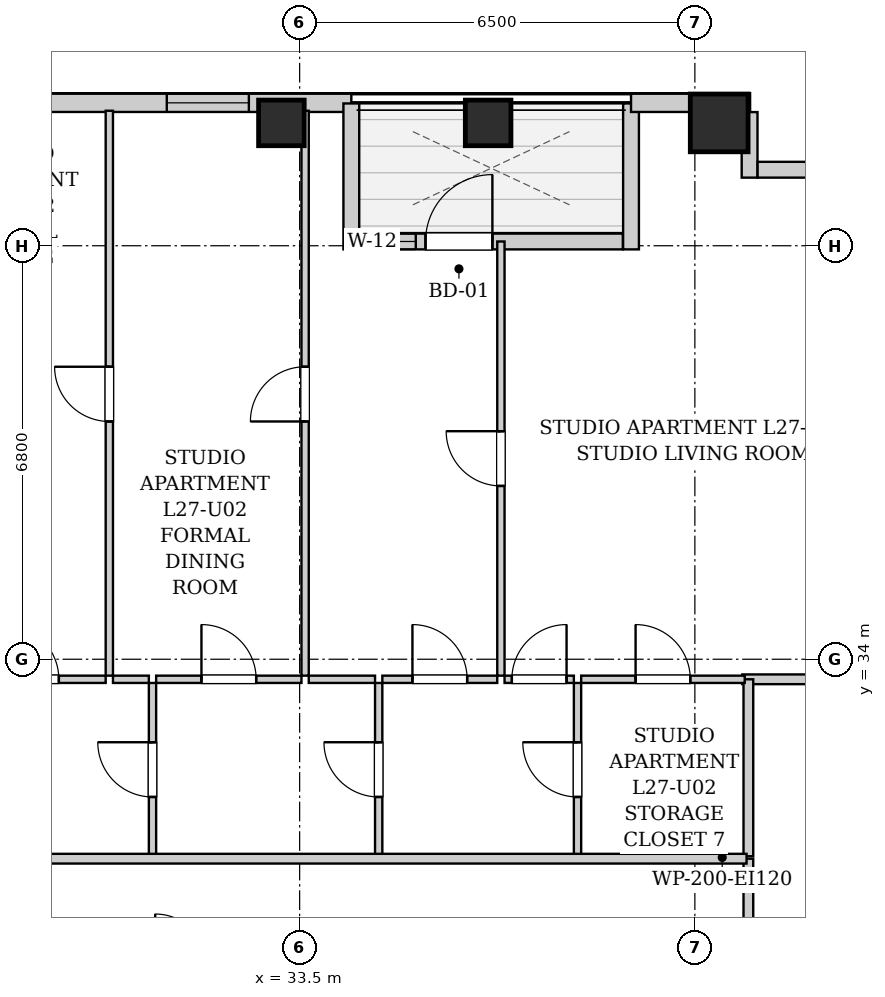
"""IFC4 building model, lengths in metres.
Left out: names, types, materials, properties, quantities, classifications, styles, units other than length and angle.
Written with IfcOpenShell. Run it as: python <this file> out.ifc"""

import sys

from ifc_helpers import new_model, si_unit, direction, frame, frame_2d, origin, origin_2d, place, context, subcontext, project, spatial, rectangle, extrude, element, fill, save


model = new_model("IFC4")
c1 = context("Model", 3, precision=1e-05, world=origin(), true_north=direction((0.0, 1.0)))
c2 = subcontext(c1, "Body", "Model", "MODEL_VIEW")
j1 = project(units=[si_unit("LENGTHUNIT", "METRE"), si_unit("PLANEANGLEUNIT", "RADIAN")], contexts=[c1])
p1 = place(None, origin())
s1 = spatial("IfcSite", under=j1, at=p1, CompositionType="ELEMENT")
p2 = place(p1, origin())
s2 = spatial("IfcBuilding", under=s1, at=p2, CompositionType="ELEMENT")
p3 = place(p2, frame((0.0, 0.0, 97.5)))
s3 = spatial("IfcBuildingStorey", under=s2, at=p3, CompositionType="ELEMENT", Elevation=97.5)
for number, where, z_axis, x_axis in (
    (1, (33.2, 42.82, 0.0), (0.0, 0.0, 1.0), (1.0, 0.0, 0.0)),
    (2, (36.6, 42.82, 0.0), (0.0, 0.0, 1.0), (1.0, 0.0, 0.0)),
):
    element("IfcColumn", number, at=place(p3, frame(where, z_axis=z_axis, x_axis=x_axis)), inside=s3, PredefinedType="COLUMN", context=c2, shape_type="SweptSolid", body=[
        extrude(rectangle(XDim=0.75, YDim=0.75, at=origin_2d()), origin(), (0.0, 0.0, 1.0), 3.2),
    ])
p4 = place(p3, frame((40.4, 42.82, 0.0), z_axis=(0.0, 0.0, 1.0), x_axis=(1.0, 0.0, 0.0)))
e3 = element("IfcColumn", 3, at=p4, inside=s3, PredefinedType="COLUMN", context=c2, shape_type="SweptSolid", body=[
    extrude(rectangle(XDim=0.95, YDim=0.95, at=origin_2d()), origin(), (0.0, 0.0, 1.0), 3.2),
])
p5 = place(p3, frame((10.0, 43.15, 0.0), z_axis=(0.0, 0.0, 1.0), x_axis=(1.0, 0.0, 0.0)))
e4 = element("IfcWall", 4, at=p5, inside=s3, PredefinedType="SOLIDWALL", context=c2, shape_type="SweptSolid", body=[
    extrude(rectangle(XDim=24.35, YDim=0.3, at=frame_2d((12.175, 0.0))), origin(), (0.0, 0.0, 1.0), 2.94),
])
p6 = place(p5, frame((1.956, 0.0, 0.55)))
e5 = element("IfcOpeningElement", 5, at=p6, cuts=e4, PredefinedType="OPENING", context=c2, shape_type="SweptSolid", body=[
    extrude(rectangle(XDim=1.35, YDim=1.2, at=frame_2d((0.675, 0.6))), frame((0.0, 0.16, 0.0), z_axis=(0.0, -1.0, 0.0), x_axis=(1.0, 0.0, 0.0)), (0.0, 0.0, 1.0), 0.32),
])
p7 = place(p5, frame((5.187, 0.0, 0.55)))
e6 = element("IfcOpeningElement", 6, at=p7, cuts=e4, PredefinedType="OPENING", context=c2, shape_type="SweptSolid", body=[
    extrude(rectangle(XDim=1.35, YDim=1.2, at=frame_2d((0.675, 0.6))), frame((0.0, 0.16, 0.0), z_axis=(0.0, -1.0, 0.0), x_axis=(1.0, 0.0, 0.0)), (0.0, 0.0, 1.0), 0.32),
])
p8 = place(p5, frame((8.418, 0.0, 0.55)))
e7 = element("IfcOpeningElement", 7, at=p8, cuts=e4, PredefinedType="OPENING", context=c2, shape_type="SweptSolid", body=[
    extrude(rectangle(XDim=1.35, YDim=1.2, at=frame_2d((0.675, 0.6))), frame((0.0, 0.16, 0.0), z_axis=(0.0, -1.0, 0.0), x_axis=(1.0, 0.0, 0.0)), (0.0, 0.0, 1.0), 0.32),
])
p9 = place(p5, frame((11.15, 0.0, 0.55)))
e8 = element("IfcOpeningElement", 8, at=p9, cuts=e4, PredefinedType="OPENING", context=c2, shape_type="SweptSolid", body=[
    extrude(rectangle(XDim=1.35, YDim=1.2, at=frame_2d((0.675, 0.6))), frame((0.0, 0.16, 0.0), z_axis=(0.0, -1.0, 0.0), x_axis=(1.0, 0.0, 0.0)), (0.0, 0.0, 1.0), 0.32),
])
p10 = place(p5, frame((18.038, 0.0, 0.55)))
e9 = element("IfcOpeningElement", 9, at=p10, cuts=e4, PredefinedType="OPENING", context=c2, shape_type="SweptSolid", body=[
    extrude(rectangle(XDim=1.35, YDim=1.2, at=frame_2d((0.675, 0.6))), frame((0.0, 0.16, 0.0), z_axis=(0.0, -1.0, 0.0), x_axis=(1.0, 0.0, 0.0)), (0.0, 0.0, 1.0), 0.32),
])
p11 = place(p5, frame((21.315, 0.0, 0.55)))
e10 = element("IfcOpeningElement", 10, at=p11, cuts=e4, PredefinedType="OPENING", context=c2, shape_type="SweptSolid", body=[
    extrude(rectangle(XDim=1.35, YDim=1.2, at=frame_2d((0.675, 0.6))), frame((0.0, 0.16, 0.0), z_axis=(0.0, -1.0, 0.0), x_axis=(1.0, 0.0, 0.0)), (0.0, 0.0, 1.0), 0.32),
])
p12 = place(p3, frame((34.35, 43.14, 0.0), z_axis=(0.0, 0.0, 1.0), x_axis=(0.0, -1.0, 0.0)))
e11 = element("IfcWall", 11, at=p12, inside=s3, PredefinedType="SOLIDWALL", context=c2, shape_type="SweptSolid", body=[
    extrude(rectangle(XDim=2.4, YDim=0.26, at=frame_2d((1.2, 0.0))), origin(), (0.0, 0.0, 1.0), 2.94),
])
p13 = place(p3, frame((34.484, 40.87, 0.0), z_axis=(0.0, 0.0, 1.0), x_axis=(1.0, 0.0, 0.0)))
e12 = element("IfcWall", 12, at=p13, inside=s3, PredefinedType="SOLIDWALL", context=c2, shape_type="SweptSolid", body=[
    extrude(rectangle(XDim=4.332, YDim=0.26, at=frame_2d((2.166, 0.0))), origin(), (0.0, 0.0, 1.0), 2.94),
])
p14 = place(p13, frame((1.086, 0.0, 0.0)))
e13 = element("IfcOpeningElement", 13, at=p14, cuts=e12, PredefinedType="OPENING", context=c2, shape_type="SweptSolid", body=[
    extrude(rectangle(XDim=1.1, YDim=2.0, at=frame_2d((0.55, 1.0))), frame((0.0, 0.14, 0.0), z_axis=(0.0, -1.0, 0.0), x_axis=(1.0, 0.0, 0.0)), (0.0, 0.0, 1.0), 0.28),
])
p15 = place(p13, frame((0.246, 0.0, 0.55)))
e14 = element("IfcOpeningElement", 14, at=p15, cuts=e12, PredefinedType="OPENING", context=c2, shape_type="SweptSolid", body=[
    extrude(rectangle(XDim=0.68, YDim=1.2, at=frame_2d((0.34, 0.6))), frame((0.0, 0.14, 0.0), z_axis=(0.0, -1.0, 0.0), x_axis=(1.0, 0.0, 0.0)), (0.0, 0.0, 1.0), 0.28),
])
p16 = place(p3, frame((38.95, 40.74, 0.0), z_axis=(0.0, 0.0, 1.0), x_axis=(0.0, 1.0, 0.0)))
e15 = element("IfcWall", 15, at=p16, inside=s3, PredefinedType="SOLIDWALL", context=c2, shape_type="SweptSolid", body=[
    extrude(rectangle(XDim=2.4, YDim=0.26, at=frame_2d((1.2, 0.0))), origin(), (0.0, 0.0, 1.0), 2.94),
])
p17 = place(p3, frame((38.95, 43.15, 0.0), z_axis=(0.0, 0.0, 1.0), x_axis=(1.0, 0.0, 0.0)))
e16 = element("IfcWall", 16, at=p17, inside=s3, PredefinedType="SOLIDWALL", context=c2, shape_type="SweptSolid", body=[
    extrude(rectangle(XDim=1.95, YDim=0.3, at=frame_2d((0.975, 0.0))), origin(), (0.0, 0.0, 1.0), 2.94),
])
p18 = place(p3, frame((40.9, 42.998, 0.0), z_axis=(0.0, 0.0, 1.0), x_axis=(0.0, -1.0, 0.0)))
e17 = element("IfcWall", 17, at=p18, inside=s3, PredefinedType="SOLIDWALL", context=c2, shape_type="SweptSolid", body=[
    extrude(rectangle(XDim=1.078, YDim=0.26, at=frame_2d((0.539, 0.0))), origin(), (0.0, 0.0, 1.0), 2.94),
])
p19 = place(p3, frame((41.032, 42.05, 0.0), z_axis=(0.0, 0.0, 1.0), x_axis=(1.0, 0.0, 0.0)))
e18 = element("IfcWall", 18, at=p19, inside=s3, PredefinedType="SOLIDWALL", context=c2, shape_type="SweptSolid", body=[
    extrude(rectangle(XDim=1.248, YDim=0.26, at=frame_2d((0.624, 0.0))), origin(), (0.0, 0.0, 1.0), 2.94),
])
p20 = place(p3, frame((40.88, 28.98, 0.0), z_axis=(0.0, 0.0, 1.0), x_axis=(0.0, 1.0, 0.0)))
e19 = element("IfcWall", 19, at=p20, inside=s3, PredefinedType="PARTITIONING", context=c2, shape_type="SweptSolid", body=[
    extrude(rectangle(XDim=1.74, YDim=0.16, at=frame_2d((0.87, 0.0))), origin(), (0.0, 0.0, 1.0), 2.94),
])
p21 = place(p3, frame((40.78, 33.67, 0.0), z_axis=(0.0, 0.0, 1.0), x_axis=(1.0, 0.0, 0.0)))
e20 = element("IfcWall", 20, at=p21, inside=s3, PredefinedType="PARTITIONING", context=c2, shape_type="SweptSolid", body=[
    extrude(rectangle(XDim=2.34, YDim=0.16, at=frame_2d((1.17, 0.0))), origin(), (0.0, 0.0, 1.0), 2.94),
])
p22 = place(p3, frame((40.88, 30.76, 0.0), z_axis=(0.0, 0.0, 1.0), x_axis=(0.0, 1.0, 0.0)))
e21 = element("IfcWall", 21, at=p22, inside=s3, PredefinedType="PARTITIONING", context=c2, shape_type="SweptSolid", body=[
    extrude(rectangle(XDim=2.91, YDim=0.16, at=frame_2d((1.455, 0.0))), origin(), (0.0, 0.0, 1.0), 2.94),
])
p23 = place(p3, frame((31.08, 30.76, 0.0), z_axis=(0.0, 0.0, 1.0), x_axis=(0.0, 1.0, 0.0)))
e22 = element("IfcWall", 22, at=p23, inside=s3, PredefinedType="PARTITIONING", context=c2, shape_type="SweptSolid", body=[
    extrude(rectangle(XDim=2.85, YDim=0.12, at=frame_2d((1.425, 0.0))), origin(), (0.0, 0.0, 1.0), 2.94),
])
p24 = place(p23, frame((0.975, 0.0, 0.0)))
e23 = element("IfcOpeningElement", 23, at=p24, cuts=e22, PredefinedType="OPENING", context=c2, shape_type="SweptSolid", body=[
    extrude(rectangle(XDim=0.9, YDim=2.05, at=frame_2d((0.45, 1.025))), frame((0.0, 0.07, 0.0), z_axis=(0.0, -1.0, 0.0), x_axis=(1.0, 0.0, 0.0)), (0.0, 0.0, 1.0), 0.14),
])
p25 = place(p3, frame((27.87, 33.67, 0.0), z_axis=(0.0, 0.0, 1.0), x_axis=(1.0, 0.0, 0.0)))
e24 = element("IfcWall", 24, at=p25, inside=s3, PredefinedType="PARTITIONING", context=c2, shape_type="SweptSolid", body=[
    extrude(rectangle(XDim=2.44, YDim=0.12, at=frame_2d((1.22, 0.0))), origin(), (0.0, 0.0, 1.0), 2.94),
])
p26 = place(p25, frame((0.77, 0.0, 0.0)))
e25 = element("IfcOpeningElement", 25, at=p26, cuts=e24, PredefinedType="OPENING", context=c2, shape_type="SweptSolid", body=[
    extrude(rectangle(XDim=0.9, YDim=2.05, at=frame_2d((0.45, 1.025))), frame((0.0, 0.07, 0.0), z_axis=(0.0, -1.0, 0.0), x_axis=(1.0, 0.0, 0.0)), (0.0, 0.0, 1.0), 0.14),
])
p27 = place(p3, frame((30.43, 33.67, 0.0), z_axis=(0.0, 0.0, 1.0), x_axis=(1.0, 0.0, 0.0)))
e26 = element("IfcWall", 26, at=p27, inside=s3, PredefinedType="PARTITIONING", context=c2, shape_type="SweptSolid", body=[
    extrude(rectangle(XDim=0.59, YDim=0.12, at=frame_2d((0.295, 0.0))), origin(), (0.0, 0.0, 1.0), 2.94),
])
p28 = place(p3, frame((34.8, 30.76, 0.0), z_axis=(0.0, 0.0, 1.0), x_axis=(0.0, 1.0, 0.0)))
e27 = element("IfcWall", 27, at=p28, inside=s3, PredefinedType="PARTITIONING", context=c2, shape_type="SweptSolid", body=[
    extrude(rectangle(XDim=2.85, YDim=0.12, at=frame_2d((1.425, 0.0))), origin(), (0.0, 0.0, 1.0), 2.94),
])
p29 = place(p28, frame((0.975, 0.0, 0.0)))
e28 = element("IfcOpeningElement", 28, at=p29, cuts=e27, PredefinedType="OPENING", context=c2, shape_type="SweptSolid", body=[
    extrude(rectangle(XDim=0.9, YDim=2.05, at=frame_2d((0.45, 1.025))), frame((0.0, 0.07, 0.0), z_axis=(0.0, -1.0, 0.0), x_axis=(1.0, 0.0, 0.0)), (0.0, 0.0, 1.0), 0.14),
])
p30 = place(p3, frame((31.14, 33.67, 0.0), z_axis=(0.0, 0.0, 1.0), x_axis=(1.0, 0.0, 0.0)))
e29 = element("IfcWall", 29, at=p30, inside=s3, PredefinedType="PARTITIONING", context=c2, shape_type="SweptSolid", body=[
    extrude(rectangle(XDim=2.39, YDim=0.12, at=frame_2d((1.195, 0.0))), origin(), (0.0, 0.0, 1.0), 2.94),
])
p31 = place(p30, frame((0.745, 0.0, 0.0)))
e30 = element("IfcOpeningElement", 30, at=p31, cuts=e29, PredefinedType="OPENING", context=c2, shape_type="SweptSolid", body=[
    extrude(rectangle(XDim=0.9, YDim=2.05, at=frame_2d((0.45, 1.025))), frame((0.0, 0.07, 0.0), z_axis=(0.0, -1.0, 0.0), x_axis=(1.0, 0.0, 0.0)), (0.0, 0.0, 1.0), 0.14),
])
p32 = place(p3, frame((33.65, 33.67, 0.0), z_axis=(0.0, 0.0, 1.0), x_axis=(1.0, 0.0, 0.0)))
e31 = element("IfcWall", 31, at=p32, inside=s3, PredefinedType="PARTITIONING", context=c2, shape_type="SweptSolid", body=[
    extrude(rectangle(XDim=1.09, YDim=0.12, at=frame_2d((0.545, 0.0))), origin(), (0.0, 0.0, 1.0), 2.94),
])
p33 = place(p3, frame((38.07, 30.76, 0.0), z_axis=(0.0, 0.0, 1.0), x_axis=(0.0, 1.0, 0.0)))
e32 = element("IfcWall", 32, at=p33, inside=s3, PredefinedType="PARTITIONING", context=c2, shape_type="SweptSolid", body=[
    extrude(rectangle(XDim=2.85, YDim=0.12, at=frame_2d((1.425, 0.0))), origin(), (0.0, 0.0, 1.0), 2.94),
])
p34 = place(p33, frame((0.975, 0.0, 0.0)))
e33 = element("IfcOpeningElement", 33, at=p34, cuts=e32, PredefinedType="OPENING", context=c2, shape_type="SweptSolid", body=[
    extrude(rectangle(XDim=0.9, YDim=2.05, at=frame_2d((0.45, 1.025))), frame((0.0, 0.07, 0.0), z_axis=(0.0, -1.0, 0.0), x_axis=(1.0, 0.0, 0.0)), (0.0, 0.0, 1.0), 0.14),
])
p35 = place(p3, frame((34.86, 33.67, 0.0), z_axis=(0.0, 0.0, 1.0), x_axis=(1.0, 0.0, 0.0)))
e34 = element("IfcWall", 34, at=p35, inside=s3, PredefinedType="PARTITIONING", context=c2, shape_type="SweptSolid", body=[
    extrude(rectangle(XDim=1.89, YDim=0.12, at=frame_2d((0.945, 0.0))), origin(), (0.0, 0.0, 1.0), 2.94),
])
p36 = place(p35, frame((0.495, 0.0, 0.0)))
e35 = element("IfcOpeningElement", 35, at=p36, cuts=e34, PredefinedType="OPENING", context=c2, shape_type="SweptSolid", body=[
    extrude(rectangle(XDim=0.9, YDim=2.05, at=frame_2d((0.45, 1.025))), frame((0.0, 0.07, 0.0), z_axis=(0.0, -1.0, 0.0), x_axis=(1.0, 0.0, 0.0)), (0.0, 0.0, 1.0), 0.14),
])
p37 = place(p3, frame((36.87, 33.67, 0.0), z_axis=(0.0, 0.0, 1.0), x_axis=(1.0, 0.0, 0.0)))
e36 = element("IfcWall", 36, at=p37, inside=s3, PredefinedType="PARTITIONING", context=c2, shape_type="SweptSolid", body=[
    extrude(rectangle(XDim=1.14, YDim=0.12, at=frame_2d((0.57, 0.0))), origin(), (0.0, 0.0, 1.0), 2.94),
])
p38 = place(p37, frame((0.12, 0.0, 0.0)))
e37 = element("IfcOpeningElement", 37, at=p38, cuts=e36, PredefinedType="OPENING", context=c2, shape_type="SweptSolid", body=[
    extrude(rectangle(XDim=0.9, YDim=2.05, at=frame_2d((0.45, 1.025))), frame((0.0, 0.07, 0.0), z_axis=(0.0, -1.0, 0.0), x_axis=(1.0, 0.0, 0.0)), (0.0, 0.0, 1.0), 0.14),
])
p39 = place(p3, frame((38.13, 33.67, 0.0), z_axis=(0.0, 0.0, 1.0), x_axis=(1.0, 0.0, 0.0)))
e38 = element("IfcWall", 38, at=p39, inside=s3, PredefinedType="PARTITIONING", context=c2, shape_type="SweptSolid", body=[
    extrude(rectangle(XDim=2.69, YDim=0.12, at=frame_2d((1.345, 0.0))), origin(), (0.0, 0.0, 1.0), 2.94),
])
p40 = place(p39, frame((0.895, 0.0, 0.0)))
e39 = element("IfcOpeningElement", 39, at=p40, cuts=e38, PredefinedType="OPENING", context=c2, shape_type="SweptSolid", body=[
    extrude(rectangle(XDim=0.9, YDim=2.05, at=frame_2d((0.45, 1.025))), frame((0.0, 0.07, 0.0), z_axis=(0.0, -1.0, 0.0), x_axis=(1.0, 0.0, 0.0)), (0.0, 0.0, 1.0), 0.14),
])
p41 = place(p3, frame((30.37, 33.73, 0.0), z_axis=(0.0, 0.0, 1.0), x_axis=(0.0, 1.0, 0.0)))
e40 = element("IfcWall", 40, at=p41, inside=s3, PredefinedType="PARTITIONING", context=c2, shape_type="SweptSolid", body=[
    extrude(rectangle(XDim=9.29, YDim=0.12, at=frame_2d((4.645, 0.0))), origin(), (0.0, 0.0, 1.0), 2.94),
])
p42 = place(p41, frame((4.18, 0.0, 0.0)))
e41 = element("IfcOpeningElement", 41, at=p42, cuts=e40, PredefinedType="OPENING", context=c2, shape_type="SweptSolid", body=[
    extrude(rectangle(XDim=0.9, YDim=2.05, at=frame_2d((0.45, 1.025))), frame((0.0, 0.07, 0.0), z_axis=(0.0, -1.0, 0.0), x_axis=(1.0, 0.0, 0.0)), (0.0, 0.0, 1.0), 0.14),
])
p43 = place(p3, frame((33.59, 33.73, 0.0), z_axis=(0.0, 0.0, 1.0), x_axis=(0.0, 1.0, 0.0)))
e42 = element("IfcWall", 42, at=p43, inside=s3, PredefinedType="PARTITIONING", context=c2, shape_type="SweptSolid", body=[
    extrude(rectangle(XDim=9.29, YDim=0.12, at=frame_2d((4.645, 0.0))), origin(), (0.0, 0.0, 1.0), 2.94),
])
p44 = place(p43, frame((4.18, 0.0, 0.0)))
e43 = element("IfcOpeningElement", 43, at=p44, cuts=e42, PredefinedType="OPENING", context=c2, shape_type="SweptSolid", body=[
    extrude(rectangle(XDim=0.9, YDim=2.05, at=frame_2d((0.45, 1.025))), frame((0.0, 0.07, 0.0), z_axis=(0.0, -1.0, 0.0), x_axis=(1.0, 0.0, 0.0)), (0.0, 0.0, 1.0), 0.14),
])
p45 = place(p3, frame((36.81, 33.73, 0.0), z_axis=(0.0, 0.0, 1.0), x_axis=(0.0, 1.0, 0.0)))
e44 = element("IfcWall", 44, at=p45, inside=s3, PredefinedType="PARTITIONING", context=c2, shape_type="SweptSolid", body=[
    extrude(rectangle(XDim=7.14, YDim=0.12, at=frame_2d((3.57, 0.0))), origin(), (0.0, 0.0, 1.0), 2.94),
])
p46 = place(p45, frame((3.12, 0.0, 0.0)))
e45 = element("IfcOpeningElement", 45, at=p46, cuts=e44, PredefinedType="OPENING", context=c2, shape_type="SweptSolid", body=[
    extrude(rectangle(XDim=0.9, YDim=2.05, at=frame_2d((0.45, 1.025))), frame((0.0, 0.07, 0.0), z_axis=(0.0, -1.0, 0.0), x_axis=(1.0, 0.0, 0.0)), (0.0, 0.0, 1.0), 0.14),
])
p47 = place(p3, frame((10.05, 30.72, 0.0), z_axis=(0.0, 0.0, 1.0), x_axis=(1.0, 0.0, 0.0)))
e46 = element("IfcWall", 46, at=p47, inside=s3, PredefinedType="PARTITIONING", context=c2, shape_type="SweptSolid", body=[
    extrude(rectangle(XDim=30.8, YDim=0.16, at=frame_2d((15.4, 0.0))), origin(), (0.0, 0.0, 1.0), 2.94),
])
p48 = place(p47, frame((4.295, 0.0, 0.0)))
e47 = element("IfcOpeningElement", 47, at=p48, cuts=e46, PredefinedType="OPENING", context=c2, shape_type="SweptSolid", body=[
    extrude(rectangle(XDim=0.95, YDim=2.1, at=frame_2d((0.475, 1.05))), frame((0.0, 0.09, 0.0), z_axis=(0.0, -1.0, 0.0), x_axis=(1.0, 0.0, 0.0)), (0.0, 0.0, 1.0), 0.18),
])
p49 = place(p24, origin())
e48 = element("IfcDoor", 48, at=p49, inside=s3, OperationType="SINGLE_SWING_RIGHT", PredefinedType="DOOR", context=c2, shape_type="SweptSolid", body=[
    extrude(rectangle(XDim=0.9, YDim=2.05, at=frame_2d((0.45, 1.025))), frame((0.0, 0.025, 0.0), z_axis=(0.0, -1.0, 0.0), x_axis=(1.0, 0.0, 0.0)), (0.0, 0.0, 1.0), 0.05),
])
fill(e23, e48)
p50 = place(p26, origin())
e49 = element("IfcDoor", 49, at=p50, inside=s3, OperationType="SINGLE_SWING_LEFT", PredefinedType="DOOR", context=c2, shape_type="SweptSolid", body=[
    extrude(rectangle(XDim=0.9, YDim=2.05, at=frame_2d((0.45, 1.025))), frame((0.0, 0.025, 0.0), z_axis=(0.0, -1.0, 0.0), x_axis=(1.0, 0.0, 0.0)), (0.0, 0.0, 1.0), 0.05),
])
fill(e25, e49)
p51 = place(p29, origin())
e50 = element("IfcDoor", 50, at=p51, inside=s3, OperationType="SINGLE_SWING_RIGHT", PredefinedType="DOOR", context=c2, shape_type="SweptSolid", body=[
    extrude(rectangle(XDim=0.9, YDim=2.05, at=frame_2d((0.45, 1.025))), frame((0.0, 0.025, 0.0), z_axis=(0.0, -1.0, 0.0), x_axis=(1.0, 0.0, 0.0)), (0.0, 0.0, 1.0), 0.05),
])
fill(e28, e50)
p52 = place(p31, origin())
e51 = element("IfcDoor", 51, at=p52, inside=s3, OperationType="SINGLE_SWING_LEFT", PredefinedType="DOOR", context=c2, shape_type="SweptSolid", body=[
    extrude(rectangle(XDim=0.9, YDim=2.05, at=frame_2d((0.45, 1.025))), frame((0.0, 0.025, 0.0), z_axis=(0.0, -1.0, 0.0), x_axis=(1.0, 0.0, 0.0)), (0.0, 0.0, 1.0), 0.05),
])
fill(e30, e51)
p53 = place(p34, origin())
e52 = element("IfcDoor", 52, at=p53, inside=s3, OperationType="SINGLE_SWING_RIGHT", PredefinedType="DOOR", context=c2, shape_type="SweptSolid", body=[
    extrude(rectangle(XDim=0.9, YDim=2.05, at=frame_2d((0.45, 1.025))), frame((0.0, 0.025, 0.0), z_axis=(0.0, -1.0, 0.0), x_axis=(1.0, 0.0, 0.0)), (0.0, 0.0, 1.0), 0.05),
])
fill(e33, e52)
p54 = place(p36, origin())
e53 = element("IfcDoor", 53, at=p54, inside=s3, OperationType="SINGLE_SWING_LEFT", PredefinedType="DOOR", context=c2, shape_type="SweptSolid", body=[
    extrude(rectangle(XDim=0.9, YDim=2.05, at=frame_2d((0.45, 1.025))), frame((0.0, 0.025, 0.0), z_axis=(0.0, -1.0, 0.0), x_axis=(1.0, 0.0, 0.0)), (0.0, 0.0, 1.0), 0.05),
])
fill(e35, e53)
p55 = place(p38, origin())
e54 = element("IfcDoor", 54, at=p55, inside=s3, OperationType="SINGLE_SWING_RIGHT", PredefinedType="DOOR", context=c2, shape_type="SweptSolid", body=[
    extrude(rectangle(XDim=0.9, YDim=2.05, at=frame_2d((0.45, 1.025))), frame((0.0, 0.025, 0.0), z_axis=(0.0, -1.0, 0.0), x_axis=(1.0, 0.0, 0.0)), (0.0, 0.0, 1.0), 0.05),
])
fill(e37, e54)
p56 = place(p40, origin())
e55 = element("IfcDoor", 55, at=p56, inside=s3, OperationType="SINGLE_SWING_LEFT", PredefinedType="DOOR", context=c2, shape_type="SweptSolid", body=[
    extrude(rectangle(XDim=0.9, YDim=2.05, at=frame_2d((0.45, 1.025))), frame((0.0, 0.025, 0.0), z_axis=(0.0, -1.0, 0.0), x_axis=(1.0, 0.0, 0.0)), (0.0, 0.0, 1.0), 0.05),
])
fill(e39, e55)
p57 = place(p42, origin())
e56 = element("IfcDoor", 56, at=p57, inside=s3, OperationType="SINGLE_SWING_RIGHT", PredefinedType="DOOR", context=c2, shape_type="SweptSolid", body=[
    extrude(rectangle(XDim=0.9, YDim=2.05, at=frame_2d((0.45, 1.025))), frame((0.0, 0.025, 0.0), z_axis=(0.0, -1.0, 0.0), x_axis=(1.0, 0.0, 0.0)), (0.0, 0.0, 1.0), 0.05),
])
fill(e41, e56)
p58 = place(p44, origin())
e57 = element("IfcDoor", 57, at=p58, inside=s3, OperationType="SINGLE_SWING_LEFT", PredefinedType="DOOR", context=c2, shape_type="SweptSolid", body=[
    extrude(rectangle(XDim=0.9, YDim=2.05, at=frame_2d((0.45, 1.025))), frame((0.0, 0.025, 0.0), z_axis=(0.0, -1.0, 0.0), x_axis=(1.0, 0.0, 0.0)), (0.0, 0.0, 1.0), 0.05),
])
fill(e43, e57)
p59 = place(p46, origin())
e58 = element("IfcDoor", 58, at=p59, inside=s3, OperationType="SINGLE_SWING_RIGHT", PredefinedType="DOOR", context=c2, shape_type="SweptSolid", body=[
    extrude(rectangle(XDim=0.9, YDim=2.05, at=frame_2d((0.45, 1.025))), frame((0.0, 0.025, 0.0), z_axis=(0.0, -1.0, 0.0), x_axis=(1.0, 0.0, 0.0)), (0.0, 0.0, 1.0), 0.05),
])
fill(e45, e58)
p60 = place(p14, origin())
e59 = element("IfcDoor", 59, at=p60, inside=s3, OperationType="SINGLE_SWING_RIGHT", PredefinedType="DOOR", context=c2, shape_type="SweptSolid", body=[
    extrude(rectangle(XDim=1.1, YDim=2.0, at=frame_2d((0.55, 1.0))), frame((0.0, 0.025, 0.0), z_axis=(0.0, -1.0, 0.0), x_axis=(1.0, 0.0, 0.0)), (0.0, 0.0, 1.0), 0.05),
])
fill(e13, e59)
p61 = place(p11, origin())
e60 = element("IfcWindow", 60, at=p61, inside=s3, PartitioningType="SINGLE_PANEL", PredefinedType="WINDOW", context=c2, shape_type="SweptSolid", body=[
    extrude(rectangle(XDim=1.35, YDim=1.2, at=frame_2d((0.675, 0.6))), frame((0.0, 0.03, 0.0), z_axis=(0.0, -1.0, 0.0), x_axis=(1.0, 0.0, 0.0)), (0.0, 0.0, 1.0), 0.06),
])
fill(e10, e60)
p62 = place(p15, origin())
e61 = element("IfcWindow", 61, at=p62, inside=s3, PartitioningType="SINGLE_PANEL", PredefinedType="WINDOW", context=c2, shape_type="SweptSolid", body=[
    extrude(rectangle(XDim=0.68, YDim=1.2, at=frame_2d((0.34, 0.6))), frame((0.0, 0.03, 0.0), z_axis=(0.0, -1.0, 0.0), x_axis=(1.0, 0.0, 0.0)), (0.0, 0.0, 1.0), 0.06),
])
fill(e14, e61)
save(model, sys.argv[1])
